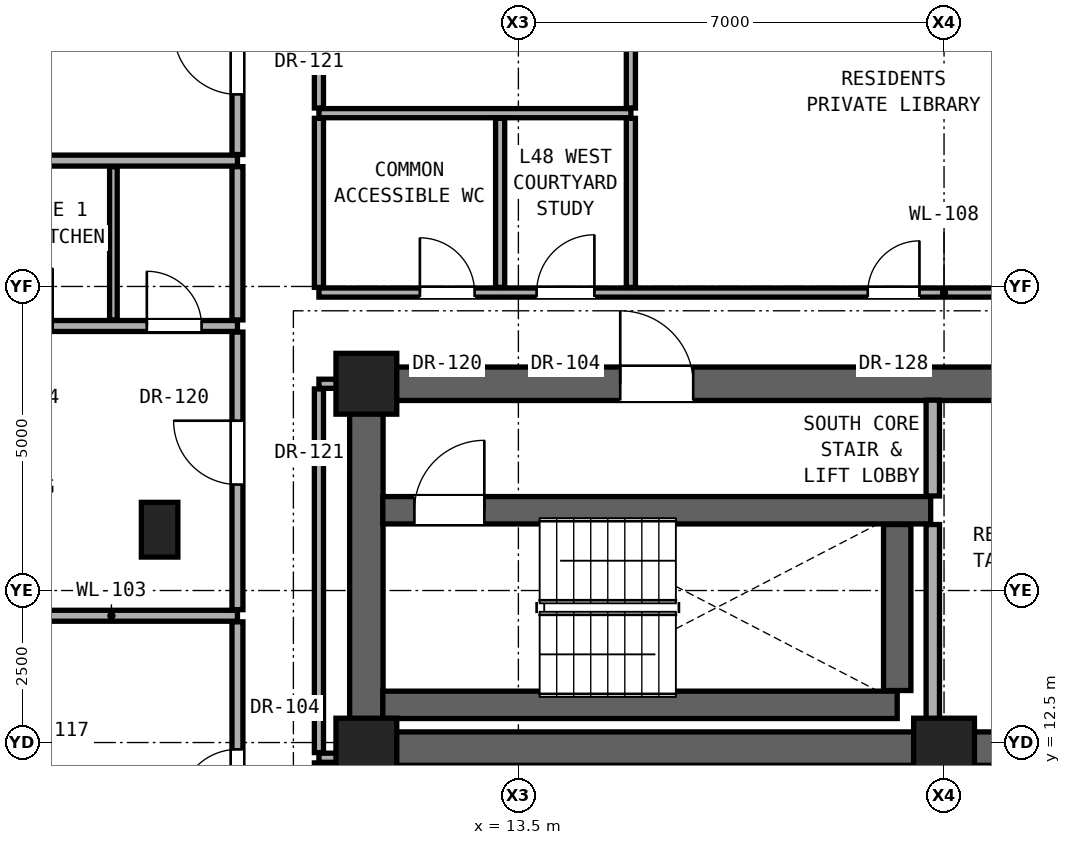
"""IFC4 building model, lengths in metres.
Left out: names, types, materials, properties, quantities, classifications, styles, units other than length and angle.
Written with IfcOpenShell. Run it as: python <this file> out.ifc"""

import sys

from ifc_helpers import new_model, si_unit, direction, frame, frame_2d, origin, origin_2d, place, context, subcontext, project, spatial, rectangle, extrude, element, fill, save


model = new_model("IFC4")
c1 = context("Model", 3, precision=1e-05, world=origin(), true_north=direction((0.0, 1.0)))
c2 = subcontext(c1, "Body", "Model", "MODEL_VIEW")
j1 = project(units=[si_unit("LENGTHUNIT", "METRE"), si_unit("PLANEANGLEUNIT", "RADIAN")], contexts=[c1])
p1 = place(None, origin())
s1 = spatial("IfcSite", under=j1, at=p1, CompositionType="ELEMENT")
p2 = place(p1, origin())
s2 = spatial("IfcBuilding", under=s1, at=p2, CompositionType="ELEMENT")
p3 = place(p2, frame((0.0, 0.0, 170.65)))
s3 = spatial("IfcBuildingStorey", under=s2, at=p3, CompositionType="ELEMENT", Elevation=170.65)
for number, where, z_axis, x_axis in (
    (1, (11.0, 12.4, 0.0), (0.0, 0.0, 1.0), (1.0, 0.0, 0.0)),
    (2, (20.5, 12.4, 0.0), (0.0, 0.0, 1.0), (1.0, 0.0, 0.0)),
    (3, (11.0, 18.4, 0.0), (0.0, 0.0, 1.0), (1.0, 0.0, 0.0)),
):
    element("IfcColumn", number, at=place(p3, frame(where, z_axis=z_axis, x_axis=x_axis)), inside=s3, PredefinedType="COLUMN", context=c2, shape_type="SweptSolid", body=[
        extrude(rectangle(XDim=1.0, YDim=1.0, at=origin_2d()), origin(), (0.0, 0.0, 1.0), 3.25),
    ])
p4 = place(p3, frame((7.6, 16.0, 0.0), z_axis=(0.0, 0.0, 1.0), x_axis=(1.0, 0.0, 0.0)))
e4 = element("IfcColumn", 4, at=p4, inside=s3, PredefinedType="PILASTER", context=c2, shape_type="SweptSolid", body=[
    extrude(rectangle(XDim=0.6, YDim=0.9, at=origin_2d()), origin(), (0.0, 0.0, 1.0), 3.25),
])
p5 = place(p3, frame((11.0, 12.4, 0.0), z_axis=(0.0, 0.0, 1.0), x_axis=(1.0, 0.0, 0.0)))
e5 = element("IfcWall", 5, at=p5, inside=s3, PredefinedType="SHEAR", context=c2, shape_type="SweptSolid", body=[
    extrude(rectangle(XDim=19.0, YDim=0.55, at=frame_2d((9.5, 0.0))), origin(), (0.0, 0.0, 1.0), 3.05),
])
p6 = place(p3, frame((11.0, 12.4, 0.0), z_axis=(0.0, 0.0, 1.0), x_axis=(0.0, 1.0, 0.0)))
e6 = element("IfcWall", 6, at=p6, inside=s3, PredefinedType="SHEAR", context=c2, shape_type="SweptSolid", body=[
    extrude(rectangle(XDim=6.0, YDim=0.55, at=frame_2d((3.0, 0.0))), origin(), (0.0, 0.0, 1.0), 3.05),
])
p7 = place(p3, frame((11.0, 18.4, 0.0), z_axis=(0.0, 0.0, 1.0), x_axis=(1.0, 0.0, 0.0)))
e7 = element("IfcWall", 7, at=p7, inside=s3, PredefinedType="SHEAR", context=c2, shape_type="SweptSolid", body=[
    extrude(rectangle(XDim=19.0, YDim=0.55, at=frame_2d((9.5, 0.0))), origin(), (0.0, 0.0, 1.0), 3.05),
])
p8 = place(p7, frame((4.175, 0.0, 0.0)))
e8 = element("IfcOpeningElement", 8, at=p8, cuts=e7, PredefinedType="OPENING", context=c2, shape_type="SweptSolid", body=[
    extrude(rectangle(XDim=1.2, YDim=2.25, at=frame_2d((0.6, 1.125))), frame((0.0, 0.285, 0.0), z_axis=(0.0, -1.0, 0.0), x_axis=(1.0, 0.0, 0.0)), (0.0, 0.0, 1.0), 0.57),
])
p9 = place(p7, frame((11.075, 0.0, 0.0)))
e9 = element("IfcOpeningElement", 9, at=p9, cuts=e7, PredefinedType="OPENING", context=c2, shape_type="SweptSolid", body=[
    extrude(rectangle(XDim=0.95, YDim=2.15, at=frame_2d((0.475, 1.075))), frame((0.0, 0.285, 0.0), z_axis=(0.0, -1.0, 0.0), x_axis=(1.0, 0.0, 0.0)), (0.0, 0.0, 1.0), 0.57),
])
p10 = place(p7, frame((14.3, 0.0, 0.0)))
e10 = element("IfcOpeningElement", 10, at=p10, cuts=e7, PredefinedType="OPENING", context=c2, shape_type="SweptSolid", body=[
    extrude(rectangle(XDim=1.3, YDim=2.3, at=frame_2d((0.65, 1.15))), frame((0.0, 0.285, 0.0), z_axis=(0.0, -1.0, 0.0), x_axis=(1.0, 0.0, 0.0)), (0.0, 0.0, 1.0), 0.57),
])
p11 = place(p7, frame((16.6, 0.0, 0.0)))
e11 = element("IfcOpeningElement", 11, at=p11, cuts=e7, PredefinedType="OPENING", context=c2, shape_type="SweptSolid", body=[
    extrude(rectangle(XDim=1.3, YDim=2.3, at=frame_2d((0.65, 1.15))), frame((0.0, 0.285, 0.0), z_axis=(0.0, -1.0, 0.0), x_axis=(1.0, 0.0, 0.0)), (0.0, 0.0, 1.0), 0.57),
])
p12 = place(p3, frame((10.22, 12.25, 0.0), z_axis=(0.0, 0.0, 1.0), x_axis=(1.0, 0.0, 0.0)))
e12 = element("IfcWall", 12, at=p12, inside=s3, PredefinedType="PARTITIONING", context=c2, shape_type="SweptSolid", body=[
    extrude(rectangle(XDim=0.51, YDim=0.15, at=frame_2d((0.255, 0.0))), origin(), (0.0, 0.0, 1.0), 3.05),
])
p13 = place(p3, frame((11.27, 13.12, 0.0), z_axis=(0.0, 0.0, 1.0), x_axis=(1.0, 0.0, 0.0)))
e13 = element("IfcWall", 13, at=p13, inside=s3, PredefinedType="SHEAR", context=c2, shape_type="SweptSolid", body=[
    extrude(rectangle(XDim=8.46, YDim=0.45, at=frame_2d((4.23, 0.0))), origin(), (0.0, 0.0, 1.0), 3.05),
])
p14 = place(p3, frame((4.735, 14.585, 0.0), z_axis=(0.0, 0.0, 1.0), x_axis=(1.0, 0.0, 0.0)))
e14 = element("IfcWall", 14, at=p14, inside=s3, PredefinedType="PARTITIONING", context=c2, shape_type="SweptSolid", body=[
    extrude(rectangle(XDim=4.145, YDim=0.18, at=frame_2d((2.072, 0.0))), origin(), (0.0, 0.0, 1.0), 3.05),
])
p15 = place(p3, frame((11.27, 16.32, 0.0), z_axis=(0.0, 0.0, 1.0), x_axis=(1.0, 0.0, 0.0)))
e15 = element("IfcWall", 15, at=p15, inside=s3, PredefinedType="SHEAR", context=c2, shape_type="SweptSolid", body=[
    extrude(rectangle(XDim=9.01, YDim=0.45, at=frame_2d((4.505, 0.0))), origin(), (0.0, 0.0, 1.0), 3.05),
])
p16 = place(p15, frame((0.52, 0.0, 0.0)))
e16 = element("IfcOpeningElement", 16, at=p16, cuts=e15, PredefinedType="OPENING", context=c2, shape_type="SweptSolid", body=[
    extrude(rectangle(XDim=1.15, YDim=2.2, at=frame_2d((0.575, 1.1))), frame((0.0, 0.235, 0.0), z_axis=(0.0, -1.0, 0.0), x_axis=(1.0, 0.0, 0.0)), (0.0, 0.0, 1.0), 0.47),
])
p17 = place(p3, frame((10.22, 18.4, 0.0), z_axis=(0.0, 0.0, 1.0), x_axis=(1.0, 0.0, 0.0)))
e17 = element("IfcWall", 17, at=p17, inside=s3, PredefinedType="PARTITIONING", context=c2, shape_type="SweptSolid", body=[
    extrude(rectangle(XDim=0.51, YDim=0.15, at=frame_2d((0.255, 0.0))), origin(), (0.0, 0.0, 1.0), 2.442),
])
p18 = place(p3, frame((-0.53, 19.35, 0.0), z_axis=(0.0, 0.0, 1.0), x_axis=(1.0, 0.0, 0.0)))
e18 = element("IfcWall", 18, at=p18, inside=s3, PredefinedType="PARTITIONING", context=c2, shape_type="SweptSolid", body=[
    extrude(rectangle(XDim=9.41, YDim=0.18, at=frame_2d((4.705, 0.0))), origin(), (0.0, 0.0, 1.0), 2.269),
])
p19 = place(p18, frame((0.806, 0.0, 0.0)))
e19 = element("IfcOpeningElement", 19, at=p19, cuts=e18, PredefinedType="OPENING", context=c2, shape_type="SweptSolid", body=[
    extrude(rectangle(XDim=0.95, YDim=2.15, at=frame_2d((0.475, 1.075))), frame((0.0, 0.1, 0.0), z_axis=(0.0, -1.0, 0.0), x_axis=(1.0, 0.0, 0.0)), (0.0, 0.0, 1.0), 0.2),
])
p20 = place(p18, frame((5.421, 0.0, 0.0)))
e20 = element("IfcOpeningElement", 20, at=p20, cuts=e18, PredefinedType="OPENING", context=c2, shape_type="SweptSolid", body=[
    extrude(rectangle(XDim=0.95, YDim=2.15, at=frame_2d((0.475, 1.075))), frame((0.0, 0.1, 0.0), z_axis=(0.0, -1.0, 0.0), x_axis=(1.0, 0.0, 0.0)), (0.0, 0.0, 1.0), 0.2),
])
p21 = place(p18, frame((7.92, 0.0, 0.0)))
e21 = element("IfcOpeningElement", 21, at=p21, cuts=e18, PredefinedType="OPENING", context=c2, shape_type="SweptSolid", body=[
    extrude(rectangle(XDim=0.9, YDim=2.1, at=frame_2d((0.45, 1.05))), frame((0.0, 0.1, 0.0), z_axis=(0.0, -1.0, 0.0), x_axis=(1.0, 0.0, 0.0)), (0.0, 0.0, 1.0), 0.2),
])
p22 = place(p3, frame((10.22, 19.9, 0.0), z_axis=(0.0, 0.0, 1.0), x_axis=(1.0, 0.0, 0.0)))
e22 = element("IfcWall", 22, at=p22, inside=s3, PredefinedType="PARTITIONING", context=c2, shape_type="SweptSolid", body=[
    extrude(rectangle(XDim=20.56, YDim=0.15, at=frame_2d((10.28, 0.0))), origin(), (0.0, 0.0, 1.0), 2.186),
])
p23 = place(p22, frame((1.66, 0.0, 0.0)))
e23 = element("IfcOpeningElement", 23, at=p23, cuts=e22, PredefinedType="OPENING", context=c2, shape_type="SweptSolid", body=[
    extrude(rectangle(XDim=0.9, YDim=2.1, at=frame_2d((0.45, 1.05))), frame((0.0, 0.085, 0.0), z_axis=(0.0, -1.0, 0.0), x_axis=(1.0, 0.0, 0.0)), (0.0, 0.0, 1.0), 0.17),
])
p24 = place(p22, frame((3.58, 0.0, 0.0)))
e24 = element("IfcOpeningElement", 24, at=p24, cuts=e22, PredefinedType="OPENING", context=c2, shape_type="SweptSolid", body=[
    extrude(rectangle(XDim=0.95, YDim=2.15, at=frame_2d((0.475, 1.075))), frame((0.0, 0.085, 0.0), z_axis=(0.0, -1.0, 0.0), x_axis=(1.0, 0.0, 0.0)), (0.0, 0.0, 1.0), 0.17),
])
p25 = place(p22, frame((9.025, 0.0, 0.0)))
e25 = element("IfcOpeningElement", 25, at=p25, cuts=e22, PredefinedType="OPENING", context=c2, shape_type="SweptSolid", body=[
    extrude(rectangle(XDim=0.85, YDim=2.01, at=frame_2d((0.425, 1.005))), frame((0.0, 0.085, 0.0), z_axis=(0.0, -1.0, 0.0), x_axis=(1.0, 0.0, 0.0)), (0.0, 0.0, 1.0), 0.17),
])
p26 = place(p22, frame((16.72, 0.0, 0.0)))
e26 = element("IfcOpeningElement", 26, at=p26, cuts=e22, PredefinedType="OPENING", context=c2, shape_type="SweptSolid", body=[
    extrude(rectangle(XDim=0.85, YDim=2.01, at=frame_2d((0.425, 1.005))), frame((0.0, 0.085, 0.0), z_axis=(0.0, -1.0, 0.0), x_axis=(1.0, 0.0, 0.0)), (0.0, 0.0, 1.0), 0.17),
])
p27 = place(p3, frame((-0.53, 22.07, 0.0), z_axis=(0.0, 0.0, 1.0), x_axis=(1.0, 0.0, 0.0)))
e27 = element("IfcWall", 27, at=p27, inside=s3, PredefinedType="PARTITIONING", context=c2, shape_type="SweptSolid", body=[
    extrude(rectangle(XDim=9.41, YDim=0.18, at=frame_2d((4.705, 0.0))), origin(), (0.0, 0.0, 1.0), 2.269),
])
p28 = place(p3, frame((10.22, 22.85, 0.0), z_axis=(0.0, 0.0, 1.0), x_axis=(1.0, 0.0, 0.0)))
e28 = element("IfcWall", 28, at=p28, inside=s3, PredefinedType="PARTITIONING", context=c2, shape_type="SweptSolid", body=[
    extrude(rectangle(XDim=5.13, YDim=0.15, at=frame_2d((2.565, 0.0))), origin(), (0.0, 0.0, 1.0), 2.186),
])
p29 = place(p3, frame((6.84, 19.45, 0.0), z_axis=(0.0, 0.0, 1.0), x_axis=(0.0, 1.0, 0.0)))
e29 = element("IfcWall", 29, at=p29, inside=s3, PredefinedType="PARTITIONING", context=c2, shape_type="SweptSolid", body=[
    extrude(rectangle(XDim=2.52, YDim=0.125, at=frame_2d((1.26, 0.0))), origin(), (0.0, 0.0, 1.0), 3.05),
])
p30 = place(p3, frame((8.88, 9.34, 0.0), z_axis=(0.0, 0.0, 1.0), x_axis=(0.0, 1.0, 0.0)))
e30 = element("IfcWall", 30, at=p30, inside=s3, PredefinedType="PARTITIONING", context=c2, shape_type="SweptSolid", body=[
    extrude(rectangle(XDim=5.145, YDim=0.18, at=frame_2d((2.573, 0.0))), origin(), (0.0, 0.0, 1.0), 3.05),
])
p31 = place(p30, frame((2.097, 0.0, 0.0)))
e31 = element("IfcOpeningElement", 31, at=p31, cuts=e30, PredefinedType="OPENING", context=c2, shape_type="SweptSolid", body=[
    extrude(rectangle(XDim=0.95, YDim=2.15, at=frame_2d((0.475, 1.075))), frame((0.0, 0.1, 0.0), z_axis=(0.0, -1.0, 0.0), x_axis=(1.0, 0.0, 0.0)), (0.0, 0.0, 1.0), 0.2),
])
p32 = place(p3, frame((8.88, 14.685, 0.0), z_axis=(0.0, 0.0, 1.0), x_axis=(0.0, 1.0, 0.0)))
e32 = element("IfcWall", 32, at=p32, inside=s3, PredefinedType="PARTITIONING", context=c2, shape_type="SweptSolid", body=[
    extrude(rectangle(XDim=4.565, YDim=0.18, at=frame_2d((2.282, 0.0))), origin(), (0.0, 0.0, 1.0), 2.442),
])
p33 = place(p32, frame((2.058, 0.0, 0.0)))
e33 = element("IfcOpeningElement", 33, at=p33, cuts=e32, PredefinedType="OPENING", context=c2, shape_type="SweptSolid", body=[
    extrude(rectangle(XDim=1.05, YDim=2.2, at=frame_2d((0.525, 1.1))), frame((0.0, 0.1, 0.0), z_axis=(0.0, -1.0, 0.0), x_axis=(1.0, 0.0, 0.0)), (0.0, 0.0, 1.0), 0.2),
])
p34 = place(p3, frame((8.88, 19.45, 0.0), z_axis=(0.0, 0.0, 1.0), x_axis=(0.0, 1.0, 0.0)))
e34 = element("IfcWall", 34, at=p34, inside=s3, PredefinedType="PARTITIONING", context=c2, shape_type="SweptSolid", body=[
    extrude(rectangle(XDim=2.52, YDim=0.18, at=frame_2d((1.26, 0.0))), origin(), (0.0, 0.0, 1.0), 3.05),
])
p35 = place(p3, frame((8.88, 22.17, 0.0), z_axis=(0.0, 0.0, 1.0), x_axis=(0.0, 1.0, 0.0)))
e35 = element("IfcWall", 35, at=p35, inside=s3, PredefinedType="PARTITIONING", context=c2, shape_type="SweptSolid", body=[
    extrude(rectangle(XDim=3.027, YDim=0.18, at=frame_2d((1.514, 0.0))), origin(), (0.0, 0.0, 1.0), 2.346),
])
p36 = place(p35, frame((0.989, 0.0, 0.0)))
e36 = element("IfcOpeningElement", 36, at=p36, cuts=e35, PredefinedType="OPENING", context=c2, shape_type="SweptSolid", body=[
    extrude(rectangle(XDim=1.05, YDim=2.2, at=frame_2d((0.525, 1.1))), frame((0.0, 0.1, 0.0), z_axis=(0.0, -1.0, 0.0), x_axis=(1.0, 0.0, 0.0)), (0.0, 0.0, 1.0), 0.2),
])
p37 = place(p3, frame((10.22, 9.34, 0.0), z_axis=(0.0, 0.0, 1.0), x_axis=(0.0, 1.0, 0.0)))
e37 = element("IfcWall", 37, at=p37, inside=s3, PredefinedType="PARTITIONING", context=c2, shape_type="SweptSolid", body=[
    extrude(rectangle(XDim=2.825, YDim=0.15, at=frame_2d((1.413, 0.0))), origin(), (0.0, 0.0, 1.0), 3.05),
])
p38 = place(p37, frame((0.887, 0.0, 0.0)))
e38 = element("IfcOpeningElement", 38, at=p38, cuts=e37, PredefinedType="OPENING", context=c2, shape_type="SweptSolid", body=[
    extrude(rectangle(XDim=1.05, YDim=2.2, at=frame_2d((0.525, 1.1))), frame((0.0, 0.085, 0.0), z_axis=(0.0, -1.0, 0.0), x_axis=(1.0, 0.0, 0.0)), (0.0, 0.0, 1.0), 0.17),
])
p39 = place(p3, frame((10.22, 12.335, 0.0), z_axis=(0.0, 0.0, 1.0), x_axis=(0.0, 1.0, 0.0)))
e39 = element("IfcWall", 39, at=p39, inside=s3, PredefinedType="PARTITIONING", context=c2, shape_type="SweptSolid", body=[
    extrude(rectangle(XDim=5.98, YDim=0.15, at=frame_2d((2.99, 0.0))), origin(), (0.0, 0.0, 1.0), 2.442),
])
p40 = place(p3, frame((10.22, 19.985, 0.0), z_axis=(0.0, 0.0, 1.0), x_axis=(0.0, 1.0, 0.0)))
e40 = element("IfcWall", 40, at=p40, inside=s3, PredefinedType="PARTITIONING", context=c2, shape_type="SweptSolid", body=[
    extrude(rectangle(XDim=2.78, YDim=0.15, at=frame_2d((1.39, 0.0))), origin(), (0.0, 0.0, 1.0), 3.05),
])
p41 = place(p3, frame((10.22, 22.935, 0.0), z_axis=(0.0, 0.0, 1.0), x_axis=(0.0, 1.0, 0.0)))
e41 = element("IfcWall", 41, at=p41, inside=s3, PredefinedType="PARTITIONING", context=c2, shape_type="SweptSolid", body=[
    extrude(rectangle(XDim=10.08, YDim=0.15, at=frame_2d((5.04, 0.0))), origin(), (0.0, 0.0, 1.0), 2.346),
])
p42 = place(p41, frame((4.565, 0.0, 0.0)))
e42 = element("IfcOpeningElement", 42, at=p42, cuts=e41, PredefinedType="OPENING", context=c2, shape_type="SweptSolid", body=[
    extrude(rectangle(XDim=0.95, YDim=2.15, at=frame_2d((0.475, 1.075))), frame((0.0, 0.085, 0.0), z_axis=(0.0, -1.0, 0.0), x_axis=(1.0, 0.0, 0.0)), (0.0, 0.0, 1.0), 0.17),
])
for number, where, z_axis, x_axis in (
    (43, (13.2, 19.985, 0.0), (0.0, 0.0, 1.0), (0.0, 1.0, 0.0)),
    (44, (15.35, 19.985, 0.0), (0.0, 0.0, 1.0), (0.0, 1.0, 0.0)),
):
    element("IfcWall", number, at=place(p3, frame(where, z_axis=z_axis, x_axis=x_axis)), inside=s3, PredefinedType="PARTITIONING", context=c2, shape_type="SweptSolid", body=[
        extrude(rectangle(XDim=2.78, YDim=0.15, at=frame_2d((1.39, 0.0))), origin(), (0.0, 0.0, 1.0), 3.05),
    ])
p43 = place(p3, frame((15.35, 22.935, 0.0), z_axis=(0.0, 0.0, 1.0), x_axis=(0.0, 1.0, 0.0)))
e45 = element("IfcWall", 45, at=p43, inside=s3, PredefinedType="PARTITIONING", context=c2, shape_type="SweptSolid", body=[
    extrude(rectangle(XDim=2.82, YDim=0.15, at=frame_2d((1.41, 0.0))), origin(), (0.0, 0.0, 1.0), 2.186),
])
p44 = place(p3, frame((19.73, 13.355, 0.0), z_axis=(0.0, 0.0, 1.0), x_axis=(0.0, 1.0, 0.0)))
e46 = element("IfcWall", 46, at=p44, inside=s3, PredefinedType="SHEAR", context=c2, shape_type="SweptSolid", body=[
    extrude(rectangle(XDim=2.73, YDim=0.45, at=frame_2d((1.365, 0.0))), origin(), (0.0, 0.0, 1.0), 3.05),
])
p45 = place(p3, frame((20.315, 12.8, 0.0), z_axis=(0.0, 0.0, 1.0), x_axis=(0.0, 1.0, 0.0)))
e47 = element("IfcWall", 47, at=p45, inside=s3, PredefinedType="SOLIDWALL", context=c2, shape_type="SweptSolid", body=[
    extrude(rectangle(XDim=3.285, YDim=0.22, at=frame_2d((1.643, 0.0))), origin(), (0.0, 0.0, 1.0), 3.05),
])
p46 = place(p3, frame((20.315, 16.555, 0.0), z_axis=(0.0, 0.0, 1.0), x_axis=(0.0, 1.0, 0.0)))
e48 = element("IfcWall", 48, at=p46, inside=s3, PredefinedType="SOLIDWALL", context=c2, shape_type="SweptSolid", body=[
    extrude(rectangle(XDim=1.575, YDim=0.22, at=frame_2d((0.788, 0.0))), origin(), (0.0, 0.0, 1.0), 3.05),
])
p47 = place(p8, origin())
e49 = element("IfcDoor", 49, at=p47, inside=s3, OperationType="SINGLE_SWING_LEFT", PredefinedType="DOOR", context=c2, shape_type="SweptSolid", body=[
    extrude(rectangle(XDim=1.2, YDim=2.25, at=frame_2d((0.6, 1.125))), frame((0.0, 0.025, 0.0), z_axis=(0.0, -1.0, 0.0), x_axis=(1.0, 0.0, 0.0)), (0.0, 0.0, 1.0), 0.05),
])
fill(e8, e49)
p48 = place(p16, origin())
e50 = element("IfcDoor", 50, at=p48, inside=s3, OperationType="SINGLE_SWING_RIGHT", PredefinedType="DOOR", context=c2, shape_type="SweptSolid", body=[
    extrude(rectangle(XDim=1.15, YDim=2.2, at=frame_2d((0.575, 1.1))), frame((0.0, 0.025, 0.0), z_axis=(0.0, -1.0, 0.0), x_axis=(1.0, 0.0, 0.0)), (0.0, 0.0, 1.0), 0.05),
])
fill(e16, e50)
p49 = place(p23, origin())
e51 = element("IfcDoor", 51, at=p49, inside=s3, OperationType="SINGLE_SWING_LEFT", PredefinedType="DOOR", context=c2, shape_type="SweptSolid", body=[
    extrude(rectangle(XDim=0.9, YDim=2.1, at=frame_2d((0.45, 1.05))), frame((0.0, 0.025, 0.0), z_axis=(0.0, -1.0, 0.0), x_axis=(1.0, 0.0, 0.0)), (0.0, 0.0, 1.0), 0.05),
])
fill(e23, e51)
p50 = place(p33, origin())
e52 = element("IfcDoor", 52, at=p50, inside=s3, OperationType="SINGLE_SWING_RIGHT", PredefinedType="DOOR", context=c2, shape_type="SweptSolid", body=[
    extrude(rectangle(XDim=1.05, YDim=2.2, at=frame_2d((0.525, 1.1))), frame((0.0, 0.025, 0.0), z_axis=(0.0, -1.0, 0.0), x_axis=(1.0, 0.0, 0.0)), (0.0, 0.0, 1.0), 0.05),
])
fill(e33, e52)
p51 = place(p20, origin())
e53 = element("IfcDoor", 53, at=p51, inside=s3, OperationType="SINGLE_SWING_RIGHT", PredefinedType="DOOR", context=c2, shape_type="SweptSolid", body=[
    extrude(rectangle(XDim=0.95, YDim=2.15, at=frame_2d((0.475, 1.075))), frame((0.0, 0.025, 0.0), z_axis=(0.0, -1.0, 0.0), x_axis=(1.0, 0.0, 0.0)), (0.0, 0.0, 1.0), 0.05),
])
fill(e20, e53)
p52 = place(p21, origin())
e54 = element("IfcDoor", 54, at=p52, inside=s3, OperationType="SINGLE_SWING_LEFT", PredefinedType="DOOR", context=c2, shape_type="SweptSolid", body=[
    extrude(rectangle(XDim=0.9, YDim=2.1, at=frame_2d((0.45, 1.05))), frame((0.0, 0.025, 0.0), z_axis=(0.0, -1.0, 0.0), x_axis=(1.0, 0.0, 0.0)), (0.0, 0.0, 1.0), 0.05),
])
fill(e21, e54)
p53 = place(p36, origin())
e55 = element("IfcDoor", 55, at=p53, inside=s3, OperationType="SINGLE_SWING_RIGHT", PredefinedType="DOOR", context=c2, shape_type="SweptSolid", body=[
    extrude(rectangle(XDim=1.05, YDim=2.2, at=frame_2d((0.525, 1.1))), frame((0.0, 0.025, 0.0), z_axis=(0.0, -1.0, 0.0), x_axis=(1.0, 0.0, 0.0)), (0.0, 0.0, 1.0), 0.05),
])
fill(e36, e55)
p54 = place(p24, origin())
e56 = element("IfcDoor", 56, at=p54, inside=s3, OperationType="SINGLE_SWING_RIGHT", PredefinedType="DOOR", context=c2, shape_type="SweptSolid", body=[
    extrude(rectangle(XDim=0.95, YDim=2.15, at=frame_2d((0.475, 1.075))), frame((0.0, 0.025, 0.0), z_axis=(0.0, -1.0, 0.0), x_axis=(1.0, 0.0, 0.0)), (0.0, 0.0, 1.0), 0.05),
])
fill(e24, e56)
p55 = place(p25, origin())
e57 = element("IfcDoor", 57, at=p55, inside=s3, OperationType="SINGLE_SWING_RIGHT", PredefinedType="DOOR", context=c2, shape_type="SweptSolid", body=[
    extrude(rectangle(XDim=0.85, YDim=2.01, at=frame_2d((0.425, 1.005))), frame((0.0, 0.025, 0.0), z_axis=(0.0, -1.0, 0.0), x_axis=(1.0, 0.0, 0.0)), (0.0, 0.0, 1.0), 0.05),
])
fill(e25, e57)
p56 = place(p31, origin())
e58 = element("IfcDoor", 58, at=p56, inside=s3, OperationType="SINGLE_SWING_LEFT", PredefinedType="DOOR", context=c2, shape_type="SweptSolid", body=[
    extrude(rectangle(XDim=0.95, YDim=2.15, at=frame_2d((0.475, 1.075))), frame((0.0, 0.025, 0.0), z_axis=(0.0, -1.0, 0.0), x_axis=(1.0, 0.0, 0.0)), (0.0, 0.0, 1.0), 0.05),
])
fill(e31, e58)
save(model, sys.argv[1])
